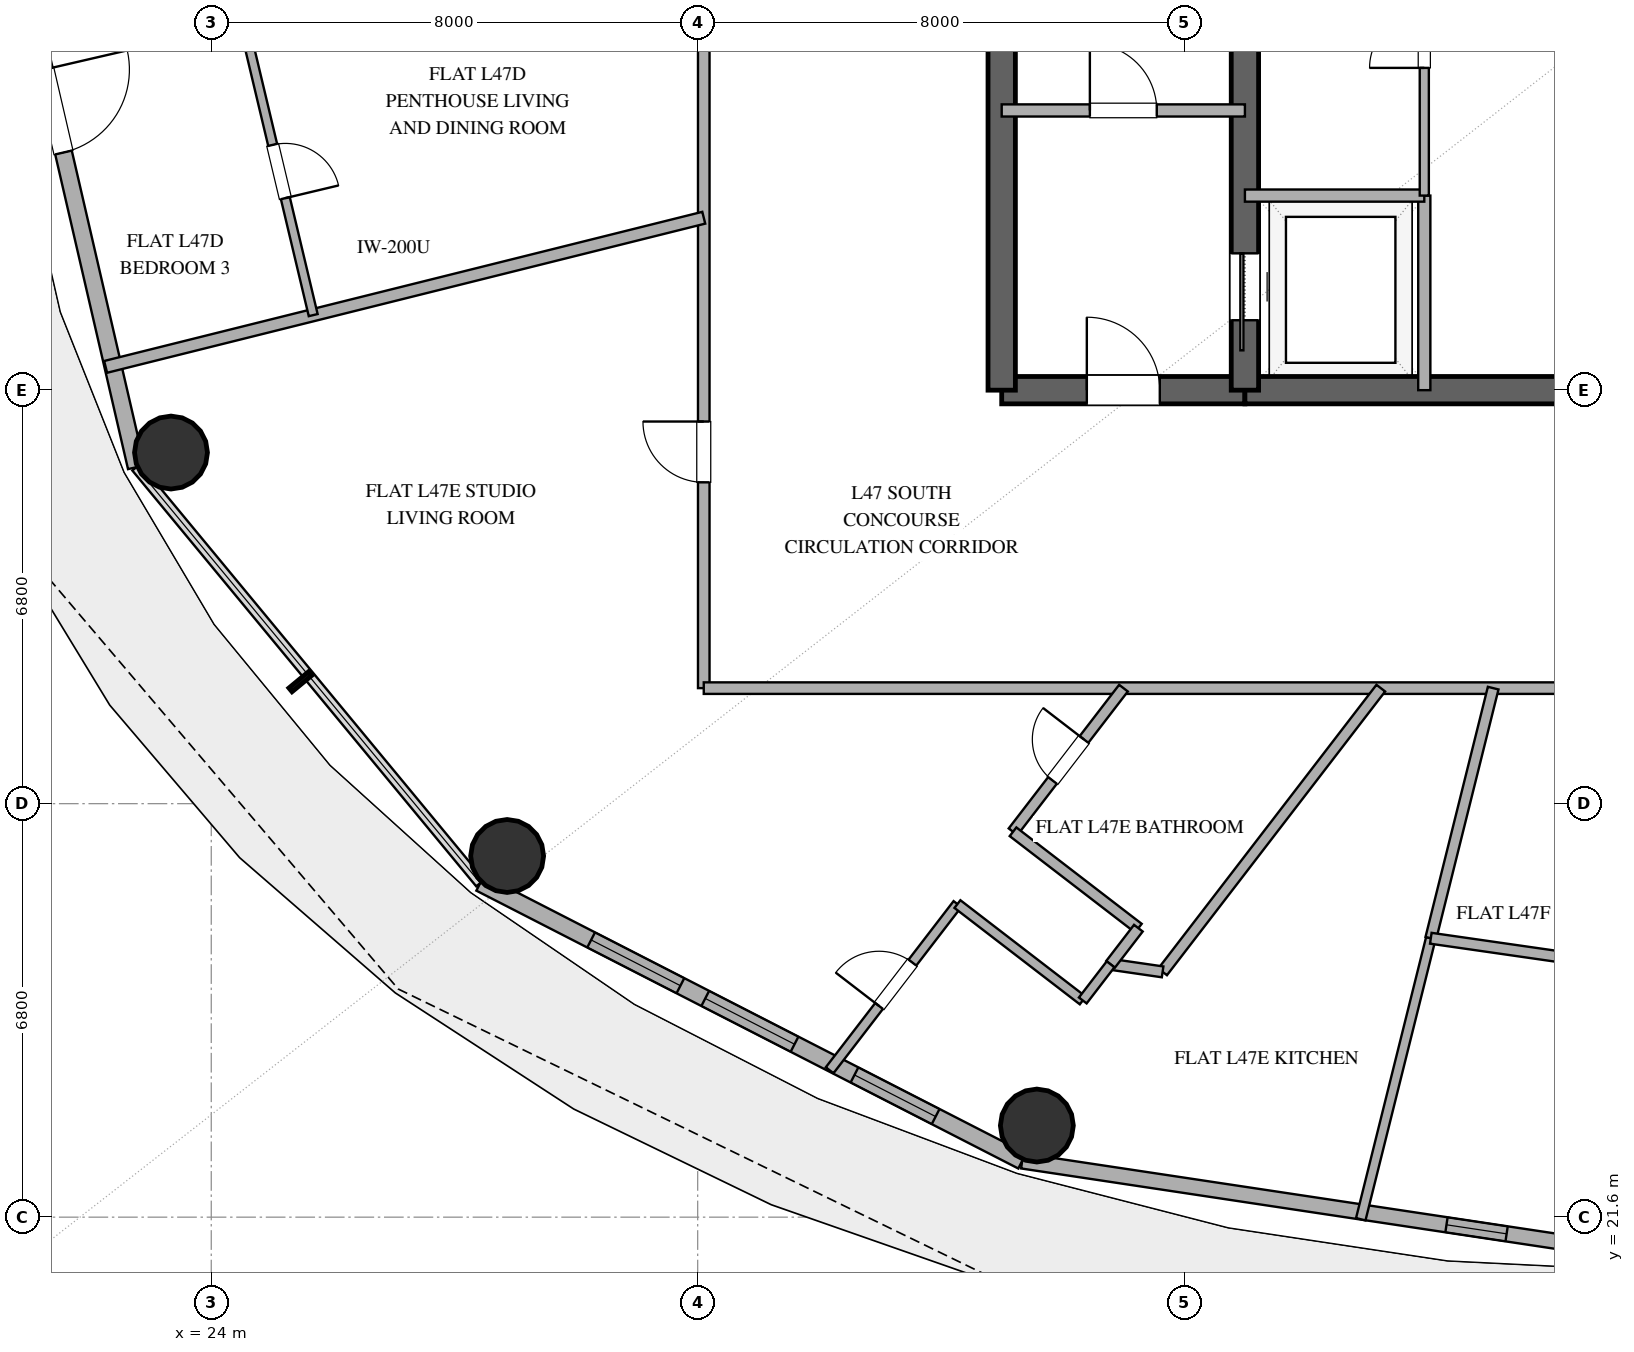
"""IFC4 building model, lengths in metres.
Left out: names, types, materials, properties, quantities, classifications, styles, units other than length and angle.
Written with IfcOpenShell. Run it as: python <this file> out.ifc"""

import sys

from ifc_helpers import new_model, si_unit, direction, frame, frame_2d, origin, origin_2d, place, context, subcontext, project, spatial, rectangle, hollow_circle, extrude, element, fill, save


model = new_model("IFC4")
c1 = context("Model", 3, precision=1e-05, world=origin(), true_north=direction((0.0, 1.0)))
c2 = subcontext(c1, "Body", "Model", "MODEL_VIEW")
j1 = project(units=[si_unit("LENGTHUNIT", "METRE"), si_unit("PLANEANGLEUNIT", "RADIAN")], contexts=[c1])
p1 = place(None, origin())
s1 = spatial("IfcSite", under=j1, at=p1, CompositionType="ELEMENT")
p2 = place(p1, origin())
s2 = spatial("IfcBuilding", under=s1, at=p2, CompositionType="ELEMENT")
p3 = place(p2, frame((0.0, 0.0, 186.6)))
s3 = spatial("IfcBuildingStorey", under=s2, at=p3, CompositionType="ELEMENT", Elevation=186.6)
p4 = place(p3, frame((37.0, 35.2, 0.0), z_axis=(0.0, 0.0, 1.0), x_axis=(1.0, 0.0, 0.0)))
e1 = element("IfcWall", 1, at=p4, inside=s3, PredefinedType="SHEAR", context=c2, shape_type="SweptSolid", body=[
    extrude(rectangle(XDim=4.0, YDim=0.45, at=frame_2d((2.0, 0.0))), origin(), (0.0, 0.0, 1.0), 3.38),
])
p5 = place(p4, frame((1.4, 0.0, 0.0)))
e2 = element("IfcOpeningElement", 2, at=p5, cuts=e1, PredefinedType="OPENING", context=c2, shape_type="SweptSolid", body=[
    extrude(rectangle(XDim=1.2, YDim=2.15, at=frame_2d((0.6, 1.075))), frame((0.0, 0.235, 0.0), z_axis=(0.0, -1.0, 0.0), x_axis=(1.0, 0.0, 0.0)), (0.0, 0.0, 1.0), 0.47),
])
p6 = place(p3, frame((41.0, 35.2, 0.0), z_axis=(0.0, 0.0, 1.0), x_axis=(1.0, 0.0, 0.0)))
e3 = element("IfcWall", 3, at=p6, inside=s3, PredefinedType="SHEAR", context=c2, shape_type="SweptSolid", body=[
    extrude(rectangle(XDim=14.0, YDim=0.45, at=frame_2d((7.0, 0.0))), origin(), (0.0, 0.0, 1.0), 3.38),
])
p7 = place(p6, frame((6.1, 0.0, 0.0)))
e4 = element("IfcOpeningElement", 4, at=p7, cuts=e3, PredefinedType="OPENING", context=c2, shape_type="SweptSolid", body=[
    extrude(rectangle(XDim=1.8, YDim=2.25, at=frame_2d((0.9, 1.125))), frame((0.0, 0.235, 0.0), z_axis=(0.0, -1.0, 0.0), x_axis=(1.0, 0.0, 0.0)), (0.0, 0.0, 1.0), 0.47),
])
p8 = place(p3, frame((37.0, 35.2, 0.0), z_axis=(0.0, 0.0, 1.0), x_axis=(0.0, 1.0, 0.0)))
e5 = element("IfcWall", 5, at=p8, inside=s3, PredefinedType="SHEAR", context=c2, shape_type="SweptSolid", body=[
    extrude(rectangle(XDim=13.6, YDim=0.45, at=frame_2d((6.8, 0.0))), origin(), (0.0, 0.0, 1.0), 3.38),
])
p9 = place(p3, frame((41.0, 35.2, 0.0), z_axis=(0.0, 0.0, 1.0), x_axis=(0.0, 1.0, 0.0)))
e6 = element("IfcWall", 6, at=p9, inside=s3, PredefinedType="SHEAR", context=c2, shape_type="SweptSolid", body=[
    extrude(rectangle(XDim=13.6, YDim=0.45, at=frame_2d((6.8, 0.0))), origin(), (0.0, 0.0, 1.0), 3.38),
])
p10 = place(p9, frame((1.15, 0.0, 0.0)))
e7 = element("IfcOpeningElement", 7, at=p10, cuts=e6, PredefinedType="OPENING", context=c2, shape_type="SweptSolid", body=[
    extrude(rectangle(XDim=1.1, YDim=2.2, at=frame_2d((0.55, 1.1))), frame((0.0, 0.235, 0.0), z_axis=(0.0, -1.0, 0.0), x_axis=(1.0, 0.0, 0.0)), (0.0, 0.0, 1.0), 0.47),
])
for number, where, z_axis, x_axis in (
    (8, (23.338, 34.174, 0.0), (0.0, 0.0, 1.0), (1.0, 0.0, 0.0)),
    (9, (28.866, 27.54, 0.0), (0.0, 0.0, 1.0), (1.0, 0.0, 0.0)),
    (10, (37.578, 23.107, 0.0), (0.0, 0.0, 1.0), (1.0, 0.0, 0.0)),
):
    element("IfcColumn", number, at=place(p3, frame(where, z_axis=z_axis, x_axis=x_axis)), inside=s3, PredefinedType="COLUMN", context=c2, shape_type="SweptSolid", body=[
        extrude(hollow_circle(Radius=0.6, WallThickness=0.032, at=origin_2d()), origin(), (0.0, 0.0, 1.0), 3.38),
    ])
p11 = place(p3, frame((20.901, 42.0, 0.0), z_axis=(0.0, 0.0, 1.0), x_axis=(0.225473184558, -0.974249374157, 0.0)))
e11 = element("IfcWall", 11, at=p11, inside=s3, PredefinedType="SOLIDWALL", context=c2, shape_type="SweptSolid", body=[
    extrude(rectangle(XDim=8.28, YDim=0.28, at=frame_2d((4.14, 0.0))), origin(), (0.0, 0.0, 1.0), 3.38),
])
p12 = place(p11, frame((1.568, 0.0, 0.0)))
e12 = element("IfcOpeningElement", 12, at=p12, cuts=e11, PredefinedType="OPENING", context=c2, shape_type="SweptSolid", body=[
    extrude(rectangle(XDim=1.4, YDim=2.2, at=frame_2d((0.7, 1.1))), frame((0.0, 0.15, 0.0), z_axis=(0.0, -1.0, 0.0), x_axis=(1.0, 0.0, 0.0)), (0.0, 0.0, 1.0), 0.3),
])
p13 = place(p3, frame((28.424, 27.094, 0.0), z_axis=(0.0, 0.0, 1.0), x_axis=(0.889872523182, -0.456209263919, 0.0)))
e13 = element("IfcWall", 13, at=p13, inside=s3, PredefinedType="SOLIDWALL", context=c2, shape_type="SweptSolid", body=[
    extrude(rectangle(XDim=10.016, YDim=0.28, at=frame_2d((5.008, 0.0))), origin(), (0.0, 0.0, 1.0), 3.38),
])
p14 = place(p13, frame((2.05, 0.0, 0.85)))
e14 = element("IfcOpeningElement", 14, at=p14, cuts=e13, PredefinedType="OPENING", context=c2, shape_type="SweptSolid", body=[
    extrude(rectangle(XDim=1.65, YDim=2.0, at=frame_2d((0.825, 1.0))), frame((0.0, 0.15, 0.0), z_axis=(0.0, -1.0, 0.0), x_axis=(1.0, 0.0, 0.0)), (0.0, 0.0, 1.0), 0.3),
])
p15 = place(p13, frame((4.159, 0.0, 0.85)))
e15 = element("IfcOpeningElement", 15, at=p15, cuts=e13, PredefinedType="OPENING", context=c2, shape_type="SweptSolid", body=[
    extrude(rectangle(XDim=1.65, YDim=2.0, at=frame_2d((0.825, 1.0))), frame((0.0, 0.15, 0.0), z_axis=(0.0, -1.0, 0.0), x_axis=(1.0, 0.0, 0.0)), (0.0, 0.0, 1.0), 0.3),
])
p16 = place(p13, frame((6.917, 0.0, 0.85)))
e16 = element("IfcOpeningElement", 16, at=p16, cuts=e13, PredefinedType="OPENING", context=c2, shape_type="SweptSolid", body=[
    extrude(rectangle(XDim=1.5, YDim=2.0, at=frame_2d((0.75, 1.0))), frame((0.0, 0.15, 0.0), z_axis=(0.0, -1.0, 0.0), x_axis=(1.0, 0.0, 0.0)), (0.0, 0.0, 1.0), 0.3),
])
p17 = place(p3, frame((37.337, 22.525, 0.0), z_axis=(0.0, 0.0, 1.0), x_axis=(0.988863993413, -0.148822049884, 0.0)))
e17 = element("IfcWall", 17, at=p17, inside=s3, PredefinedType="SOLIDWALL", context=c2, shape_type="SweptSolid", body=[
    extrude(rectangle(XDim=10.783, YDim=0.25, at=frame_2d((5.392, 0.0))), origin(), (0.0, 0.0, 1.0), 3.38),
])
p18 = place(p17, frame((7.056, 0.0, 1.42)))
e18 = element("IfcOpeningElement", 18, at=p18, cuts=e17, PredefinedType="OPENING", context=c2, shape_type="SweptSolid", body=[
    extrude(rectangle(XDim=1.0, YDim=1.05, at=frame_2d((0.5, 0.525))), frame((0.0, 0.135, 0.0), z_axis=(0.0, -1.0, 0.0), x_axis=(1.0, 0.0, 0.0)), (0.0, 0.0, 1.0), 0.27),
])
p19 = place(p3, frame((37.0, 39.8, 0.0), z_axis=(0.0, 0.0, 1.0), x_axis=(1.0, 0.0, 0.0)))
e19 = element("IfcWall", 19, at=p19, inside=s3, PredefinedType="SOLIDWALL", context=c2, shape_type="SweptSolid", body=[
    extrude(rectangle(XDim=4.0, YDim=0.2, at=frame_2d((2.0, 0.0))), origin(), (0.0, 0.0, 1.0), 2.74),
])
p20 = place(p19, frame((1.45, 0.0, 0.0)))
e20 = element("IfcOpeningElement", 20, at=p20, cuts=e19, PredefinedType="OPENING", context=c2, shape_type="SweptSolid", body=[
    extrude(rectangle(XDim=1.1, YDim=2.15, at=frame_2d((0.55, 1.075))), frame((0.0, 0.11, 0.0), z_axis=(0.0, -1.0, 0.0), x_axis=(1.0, 0.0, 0.0)), (0.0, 0.0, 1.0), 0.22),
])
p21 = place(p3, frame((43.95, 35.2, 0.0), z_axis=(0.0, 0.0, 1.0), x_axis=(0.0, 1.0, 0.0)))
e21 = element("IfcWall", 21, at=p21, inside=s3, PredefinedType="SOLIDWALL", context=c2, shape_type="SweptSolid", body=[
    extrude(rectangle(XDim=3.2, YDim=0.2, at=frame_2d((1.6, 0.0))), origin(), (0.0, 0.0, 1.0), 2.74),
])
p22 = place(p3, frame((41.0, 38.4, 0.0), z_axis=(0.0, 0.0, 1.0), x_axis=(1.0, 0.0, 0.0)))
e22 = element("IfcWall", 22, at=p22, inside=s3, PredefinedType="SOLIDWALL", context=c2, shape_type="SweptSolid", body=[
    extrude(rectangle(XDim=2.95, YDim=0.2, at=frame_2d((1.475, 0.0))), origin(), (0.0, 0.0, 1.0), 2.74),
])
p23 = place(p3, frame((43.95, 38.4, 0.0), z_axis=(0.0, 0.0, 1.0), x_axis=(0.0, 1.0, 0.0)))
e23 = element("IfcWall", 23, at=p23, inside=s3, PredefinedType="PARTITIONING", context=c2, shape_type="SweptSolid", body=[
    extrude(rectangle(XDim=5.18, YDim=0.15, at=frame_2d((2.59, 0.0))), origin(), (0.0, 0.0, 1.0), 2.74),
])
p24 = place(p23, frame((2.1, 0.0, 0.0)))
e24 = element("IfcOpeningElement", 24, at=p24, cuts=e23, PredefinedType="OPENING", context=c2, shape_type="SweptSolid", body=[
    extrude(rectangle(XDim=0.9, YDim=2.15, at=frame_2d((0.45, 1.075))), frame((0.0, 0.085, 0.0), z_axis=(0.0, -1.0, 0.0), x_axis=(1.0, 0.0, 0.0)), (0.0, 0.0, 1.0), 0.17),
])
p25 = place(p3, frame((32.1, 30.3, 0.0), z_axis=(0.0, 0.0, 1.0), x_axis=(0.0, 1.0, 0.0)))
e25 = element("IfcWall", 25, at=p25, inside=s3, PredefinedType="PARTITIONING", context=c2, shape_type="SweptSolid", body=[
    extrude(rectangle(XDim=12.53, YDim=0.19, at=frame_2d((6.265, 0.0))), origin(), (0.0, 0.0, 1.0), 2.74),
])
p26 = place(p25, frame((3.384, 0.0, 0.0)))
e26 = element("IfcOpeningElement", 26, at=p26, cuts=e25, PredefinedType="OPENING", context=c2, shape_type="SweptSolid", body=[
    extrude(rectangle(XDim=1.0, YDim=2.2, at=frame_2d((0.5, 1.1))), frame((0.0, 0.105, 0.0), z_axis=(0.0, -1.0, 0.0), x_axis=(1.0, 0.0, 0.0)), (0.0, 0.0, 1.0), 0.21),
])
p27 = place(p3, frame((46.818, 30.3, 0.0), z_axis=(0.0, 0.0, 1.0), x_axis=(-1.0, 0.0, 0.0)))
e27 = element("IfcWall", 27, at=p27, inside=s3, PredefinedType="PARTITIONING", context=c2, shape_type="SweptSolid", body=[
    extrude(rectangle(XDim=14.718, YDim=0.19, at=frame_2d((7.359, 0.0))), origin(), (0.0, 0.0, 1.0), 2.74),
])
p28 = place(p3, frame((22.263, 35.583, 0.0), z_axis=(0.0, 0.0, 1.0), x_axis=(0.970298114693, 0.241912315983, 0.0)))
e28 = element("IfcWall", 28, at=p28, inside=s3, PredefinedType="PARTITIONING", context=c2, shape_type="SweptSolid", body=[
    extrude(rectangle(XDim=10.138, YDim=0.2, at=frame_2d((5.069, 0.0))), origin(), (0.0, 0.0, 1.0), 2.74),
])
p29 = place(p3, frame((39.646, 25.634, 0.0), z_axis=(0.0, 0.0, 1.0), x_axis=(0.609572446913, 0.792730365234, 0.0)))
e29 = element("IfcWall", 29, at=p29, inside=s3, PredefinedType="PLUMBINGWALL", context=c2, shape_type="SweptSolid", body=[
    extrude(rectangle(XDim=5.886, YDim=0.18, at=frame_2d((2.943, 0.0))), origin(), (0.0, 0.0, 1.0), 2.74),
])
p30 = place(p3, frame((24.552, 41.158, 0.0), z_axis=(0.0, 0.0, 1.0), x_axis=(0.231625058686, -0.972805135774, 0.0)))
e30 = element("IfcWall", 30, at=p30, inside=s3, PredefinedType="PARTITIONING", context=c2, shape_type="SweptSolid", body=[
    extrude(rectangle(XDim=4.856, YDim=0.15, at=frame_2d((2.428, 0.0))), origin(), (0.0, 0.0, 1.0), 2.74),
])
p31 = place(p30, frame((1.978, 0.0, 0.0)))
e31 = element("IfcOpeningElement", 31, at=p31, cuts=e30, PredefinedType="OPENING", context=c2, shape_type="SweptSolid", body=[
    extrude(rectangle(XDim=0.9, YDim=2.1, at=frame_2d((0.45, 1.05))), frame((0.0, 0.085, 0.0), z_axis=(0.0, -1.0, 0.0), x_axis=(1.0, 0.0, 0.0)), (0.0, 0.0, 1.0), 0.17),
])
p32 = place(p3, frame((42.905, 21.566, 0.0), z_axis=(0.0, 0.0, 1.0), x_axis=(0.24192039409, 0.970296100643, 0.0)))
e32 = element("IfcWall", 32, at=p32, inside=s3, PredefinedType="PLUMBINGWALL", context=c2, shape_type="SweptSolid", body=[
    extrude(rectangle(XDim=4.762, YDim=0.16, at=frame_2d((2.381, 0.0))), origin(), (0.0, 0.0, 1.0), 2.74),
])
p33 = place(p3, frame((44.057, 26.187, 0.0), z_axis=(0.0, 0.0, 1.0), x_axis=(0.241939344098, 0.97029137571, 0.0)))
e33 = element("IfcWall", 33, at=p33, inside=s3, PredefinedType="PLUMBINGWALL", context=c2, shape_type="SweptSolid", body=[
    extrude(rectangle(XDim=4.239, YDim=0.18, at=frame_2d((2.12, 0.0))), origin(), (0.0, 0.0, 1.0), 2.74),
])
p34 = place(p3, frame((48.0, 25.62, 0.0), z_axis=(0.0, 0.0, 1.0), x_axis=(-0.989829001183, 0.14226225226, 0.0)))
e34 = element("IfcWall", 34, at=p34, inside=s3, PredefinedType="PLUMBINGWALL", context=c2, shape_type="SweptSolid", body=[
    extrude(rectangle(XDim=3.983, YDim=0.18, at=frame_2d((1.992, 0.0))), origin(), (0.0, 0.0, 1.0), 2.74),
])
p35 = place(p3, frame((34.17, 24.016, 0.0), z_axis=(0.0, 0.0, 1.0), x_axis=(0.609597828201, 0.792710847568, 0.0)))
e35 = element("IfcWall", 35, at=p35, inside=s3, PredefinedType="PLUMBINGWALL", context=c2, shape_type="SweptSolid", body=[
    extrude(rectangle(XDim=3.448, YDim=0.16, at=frame_2d((1.724, 0.0))), origin(), (0.0, 0.0, 1.0), 2.74),
])
p36 = place(p35, frame((1.334, 0.0, 0.0)))
e36 = element("IfcOpeningElement", 36, at=p36, cuts=e35, PredefinedType="OPENING", context=c2, shape_type="SweptSolid", body=[
    extrude(rectangle(XDim=0.9, YDim=2.1, at=frame_2d((0.45, 1.05))), frame((0.0, 0.09, 0.0), z_axis=(0.0, -1.0, 0.0), x_axis=(1.0, 0.0, 0.0)), (0.0, 0.0, 1.0), 0.18),
])
p37 = place(p3, frame((37.186, 27.938, 0.0), z_axis=(0.0, 0.0, 1.0), x_axis=(0.609591964346, 0.792715356862, 0.0)))
e37 = element("IfcWall", 37, at=p37, inside=s3, PredefinedType="PLUMBINGWALL", context=c2, shape_type="SweptSolid", body=[
    extrude(rectangle(XDim=2.98, YDim=0.18, at=frame_2d((1.49, 0.0))), origin(), (0.0, 0.0, 1.0), 2.74),
])
p38 = place(p37, frame((1.065, 0.0, 0.0)))
e38 = element("IfcOpeningElement", 38, at=p38, cuts=e37, PredefinedType="OPENING", context=c2, shape_type="SweptSolid", body=[
    extrude(rectangle(XDim=0.85, YDim=2.1, at=frame_2d((0.425, 1.05))), frame((0.0, 0.1, 0.0), z_axis=(0.0, -1.0, 0.0), x_axis=(1.0, 0.0, 0.0)), (0.0, 0.0, 1.0), 0.2),
])
p39 = place(p3, frame((39.248, 26.353, 0.0), z_axis=(0.0, 0.0, 1.0), x_axis=(-0.792732166763, 0.609570104073, 0.0)))
e39 = element("IfcWall", 39, at=p39, inside=s3, PredefinedType="PLUMBINGWALL", context=c2, shape_type="SweptSolid", body=[
    extrude(rectangle(XDim=2.601, YDim=0.18, at=frame_2d((1.3, 0.0))), origin(), (0.0, 0.0, 1.0), 2.74),
])
p40 = place(p3, frame((36.272, 26.749, 0.0), z_axis=(0.0, 0.0, 1.0), x_axis=(0.792742649864, -0.609556470794, 0.0)))
e40 = element("IfcWall", 40, at=p40, inside=s3, PredefinedType="PLUMBINGWALL", context=c2, shape_type="SweptSolid", body=[
    extrude(rectangle(XDim=2.6, YDim=0.16, at=frame_2d((1.3, 0.0))), origin(), (0.0, 0.0, 1.0), 2.74),
])
p41 = place(p3, frame((38.791, 25.758, 0.0), z_axis=(0.0, 0.0, 1.0), x_axis=(0.989584977247, -0.143949896861, 0.0)))
e41 = element("IfcWall", 41, at=p41, inside=s3, PredefinedType="PLUMBINGWALL", context=c2, shape_type="SweptSolid", body=[
    extrude(rectangle(XDim=0.865, YDim=0.18, at=frame_2d((0.433, 0.0))), origin(), (0.0, 0.0, 1.0), 2.74),
])
p42 = place(p3, frame((38.791, 25.758, 0.0), z_axis=(0.0, 0.0, 1.0), x_axis=(0.609695029381, 0.792636089986, 0.0)))
e42 = element("IfcWall", 42, at=p42, inside=s3, PredefinedType="PLUMBINGWALL", context=c2, shape_type="SweptSolid", body=[
    extrude(rectangle(XDim=0.75, YDim=0.18, at=frame_2d((0.375, 0.0))), origin(), (0.0, 0.0, 1.0), 2.74),
])
p43 = place(p3, frame((38.333, 25.164, 0.0), z_axis=(0.0, 0.0, 1.0), x_axis=(0.609695029381, 0.792636089986, 0.0)))
e43 = element("IfcWall", 43, at=p43, inside=s3, PredefinedType="PLUMBINGWALL", context=c2, shape_type="SweptSolid", body=[
    extrude(rectangle(XDim=0.75, YDim=0.16, at=frame_2d((0.375, 0.0))), origin(), (0.0, 0.0, 1.0), 2.74),
])
p44 = place(p12, origin())
e44 = element("IfcDoor", 44, at=p44, inside=s3, OperationType="SINGLE_SWING_LEFT", PredefinedType="DOOR", context=c2, shape_type="SweptSolid", body=[
    extrude(rectangle(XDim=1.4, YDim=2.2, at=frame_2d((0.7, 1.1))), frame((0.0, 0.025, 0.0), z_axis=(0.0, -1.0, 0.0), x_axis=(1.0, 0.0, 0.0)), (0.0, 0.0, 1.0), 0.05),
])
fill(e12, e44)
p45 = place(p14, origin())
e45 = element("IfcWindow", 45, at=p45, inside=s3, PartitioningType="SINGLE_PANEL", PredefinedType="WINDOW", context=c2, shape_type="SweptSolid", body=[
    extrude(rectangle(XDim=1.65, YDim=2.0, at=frame_2d((0.825, 1.0))), frame((0.0, 0.03, 0.0), z_axis=(0.0, -1.0, 0.0), x_axis=(1.0, 0.0, 0.0)), (0.0, 0.0, 1.0), 0.06),
])
fill(e14, e45)
p46 = place(p15, origin())
e46 = element("IfcWindow", 46, at=p46, inside=s3, PartitioningType="SINGLE_PANEL", PredefinedType="WINDOW", context=c2, shape_type="SweptSolid", body=[
    extrude(rectangle(XDim=1.65, YDim=2.0, at=frame_2d((0.825, 1.0))), frame((0.0, 0.03, 0.0), z_axis=(0.0, -1.0, 0.0), x_axis=(1.0, 0.0, 0.0)), (0.0, 0.0, 1.0), 0.06),
])
fill(e15, e46)
p47 = place(p16, origin())
e47 = element("IfcWindow", 47, at=p47, inside=s3, PartitioningType="SINGLE_PANEL", PredefinedType="WINDOW", context=c2, shape_type="SweptSolid", body=[
    extrude(rectangle(XDim=1.5, YDim=2.0, at=frame_2d((0.75, 1.0))), frame((0.0, 0.03, 0.0), z_axis=(0.0, -1.0, 0.0), x_axis=(1.0, 0.0, 0.0)), (0.0, 0.0, 1.0), 0.06),
])
fill(e16, e47)
p48 = place(p18, origin())
e48 = element("IfcWindow", 48, at=p48, inside=s3, PartitioningType="SINGLE_PANEL", PredefinedType="WINDOW", context=c2, shape_type="SweptSolid", body=[
    extrude(rectangle(XDim=1.0, YDim=1.05, at=frame_2d((0.5, 0.525))), frame((0.0, 0.03, 0.0), z_axis=(0.0, -1.0, 0.0), x_axis=(1.0, 0.0, 0.0)), (0.0, 0.0, 1.0), 0.06),
])
fill(e18, e48)
p49 = place(p10, origin())
e49 = element("IfcDoor", 49, at=p49, inside=s3, OperationType="SLIDING_TO_LEFT", PredefinedType="DOOR", context=c2, shape_type="SweptSolid", body=[
    extrude(rectangle(XDim=1.1, YDim=2.2, at=frame_2d((0.55, 1.1))), frame((0.0, 0.025, 0.0), z_axis=(0.0, -1.0, 0.0), x_axis=(1.0, 0.0, 0.0)), (0.0, 0.0, 1.0), 0.05),
])
fill(e7, e49)
p50 = place(p5, origin())
e50 = element("IfcDoor", 50, at=p50, inside=s3, OperationType="SINGLE_SWING_LEFT", PredefinedType="DOOR", context=c2, shape_type="SweptSolid", body=[
    extrude(rectangle(XDim=1.2, YDim=2.15, at=frame_2d((0.6, 1.075))), frame((0.0, 0.025, 0.0), z_axis=(0.0, -1.0, 0.0), x_axis=(1.0, 0.0, 0.0)), (0.0, 0.0, 1.0), 0.05),
])
fill(e2, e50)
p51 = place(p20, origin())
e51 = element("IfcDoor", 51, at=p51, inside=s3, OperationType="SINGLE_SWING_LEFT", PredefinedType="DOOR", context=c2, shape_type="SweptSolid", body=[
    extrude(rectangle(XDim=1.1, YDim=2.15, at=frame_2d((0.55, 1.075))), frame((0.0, 0.025, 0.0), z_axis=(0.0, -1.0, 0.0), x_axis=(1.0, 0.0, 0.0)), (0.0, 0.0, 1.0), 0.05),
])
fill(e20, e51)
p52 = place(p24, origin())
e52 = element("IfcDoor", 52, at=p52, inside=s3, OperationType="SINGLE_SWING_LEFT", PredefinedType="DOOR", context=c2, shape_type="SweptSolid", body=[
    extrude(rectangle(XDim=0.9, YDim=2.15, at=frame_2d((0.45, 1.075))), frame((0.0, 0.025, 0.0), z_axis=(0.0, -1.0, 0.0), x_axis=(1.0, 0.0, 0.0)), (0.0, 0.0, 1.0), 0.05),
])
fill(e24, e52)
p53 = place(p26, origin())
e53 = element("IfcDoor", 53, at=p53, inside=s3, OperationType="SINGLE_SWING_RIGHT", PredefinedType="DOOR", context=c2, shape_type="SweptSolid", body=[
    extrude(rectangle(XDim=1.0, YDim=2.2, at=frame_2d((0.5, 1.1))), frame((0.0, 0.025, 0.0), z_axis=(0.0, -1.0, 0.0), x_axis=(1.0, 0.0, 0.0)), (0.0, 0.0, 1.0), 0.05),
])
fill(e26, e53)
p54 = place(p31, origin())
e54 = element("IfcDoor", 54, at=p54, inside=s3, OperationType="SINGLE_SWING_RIGHT", PredefinedType="DOOR", context=c2, shape_type="SweptSolid", body=[
    extrude(rectangle(XDim=0.9, YDim=2.1, at=frame_2d((0.45, 1.05))), frame((0.0, 0.025, 0.0), z_axis=(0.0, -1.0, 0.0), x_axis=(1.0, 0.0, 0.0)), (0.0, 0.0, 1.0), 0.05),
])
fill(e31, e54)
p55 = place(p36, origin())
e55 = element("IfcDoor", 55, at=p55, inside=s3, OperationType="SINGLE_SWING_LEFT", PredefinedType="DOOR", context=c2, shape_type="SweptSolid", body=[
    extrude(rectangle(XDim=0.9, YDim=2.1, at=frame_2d((0.45, 1.05))), frame((0.0, 0.025, 0.0), z_axis=(0.0, -1.0, 0.0), x_axis=(1.0, 0.0, 0.0)), (0.0, 0.0, 1.0), 0.05),
])
fill(e36, e55)
p56 = place(p38, origin())
e56 = element("IfcDoor", 56, at=p56, inside=s3, OperationType="SINGLE_SWING_RIGHT", PredefinedType="DOOR", context=c2, shape_type="SweptSolid", body=[
    extrude(rectangle(XDim=0.85, YDim=2.1, at=frame_2d((0.425, 1.05))), frame((0.0, 0.025, 0.0), z_axis=(0.0, -1.0, 0.0), x_axis=(1.0, 0.0, 0.0)), (0.0, 0.0, 1.0), 0.05),
])
fill(e38, e56)
save(model, sys.argv[1])
